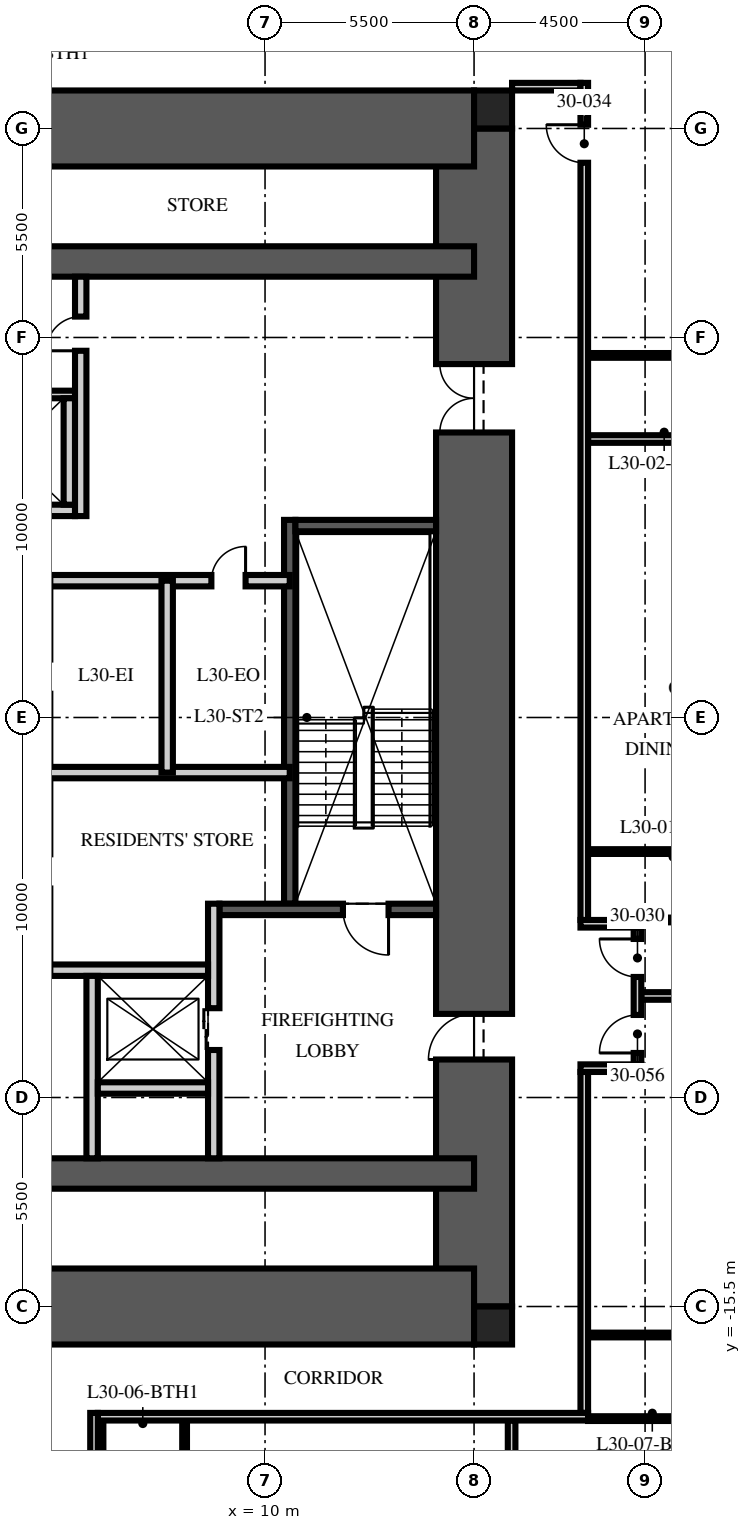
"""IFC4 building model, lengths in metres.
Left out: names, types, materials, properties, quantities, classifications, styles, units other than length and angle.
Written with IfcOpenShell. Run it as: python <this file> out.ifc"""

import sys

from ifc_helpers import new_model, si_unit, direction, frame, frame_2d, origin, origin_2d, place, context, subcontext, project, spatial, rectangle, extrude, element, fill, save


model = new_model("IFC4")
c1 = context("Model", 3, precision=1e-05, world=origin(), true_north=direction((0.0, 1.0)))
c2 = subcontext(c1, "Body", "Model", "MODEL_VIEW")
j1 = project(units=[si_unit("LENGTHUNIT", "METRE"), si_unit("PLANEANGLEUNIT", "RADIAN")], contexts=[c1])
p1 = place(None, origin())
s1 = spatial("IfcSite", under=j1, at=p1, CompositionType="ELEMENT")
p2 = place(p1, origin())
s2 = spatial("IfcBuilding", under=s1, at=p2, CompositionType="ELEMENT")
p3 = place(p2, frame((0.0, 0.0, 122.25)))
s3 = spatial("IfcBuildingStorey", under=s2, at=p3, CompositionType="ELEMENT", Elevation=122.25)
p4 = place(p3, frame((15.5, -15.5, -0.25), z_axis=(0.0, 0.0, 1.0), x_axis=(0.0, 1.0, 0.0)))
e1 = element("IfcWall", 1, at=p4, inside=s3, PredefinedType="SHEAR", context=c2, shape_type="SweptSolid", body=[
    extrude(rectangle(XDim=31.0, YDim=2.0, at=frame_2d((15.5, 0.0))), origin(), (0.0, 0.0, 1.0), 3.75),
])
p5 = place(p4, frame((6.5, 0.0, 0.25)))
e2 = element("IfcOpeningElement", 2, at=p5, cuts=e1, PredefinedType="OPENING", context=c2, shape_type="SweptSolid", body=[
    extrude(rectangle(XDim=1.2, YDim=2.1, at=frame_2d((0.6, 1.05))), frame((0.0, 1.01, 0.0), z_axis=(0.0, -1.0, 0.0), x_axis=(1.0, 0.0, 0.0)), (0.0, 0.0, 1.0), 2.02),
])
p6 = place(p4, frame((23.0, 0.0, 0.25)))
e3 = element("IfcOpeningElement", 3, at=p6, cuts=e1, PredefinedType="OPENING", context=c2, shape_type="SweptSolid", body=[
    extrude(rectangle(XDim=1.8, YDim=2.1, at=frame_2d((0.9, 1.05))), frame((0.0, 1.01, 0.0), z_axis=(0.0, -1.0, 0.0), x_axis=(1.0, 0.0, 0.0)), (0.0, 0.0, 1.0), 2.02),
])
p7 = place(p3, frame((-15.5, 15.5, -0.25), z_axis=(0.0, 0.0, 1.0), x_axis=(1.0, 0.0, 0.0)))
e4 = element("IfcWall", 4, at=p7, inside=s3, PredefinedType="SHEAR", context=c2, shape_type="SweptSolid", body=[
    extrude(rectangle(XDim=31.0, YDim=2.0, at=frame_2d((15.5, 0.0))), origin(), (0.0, 0.0, 1.0), 3.75),
])
p8 = place(p7, frame((5.0, 0.0, 0.25)))
e5 = element("IfcOpeningElement", 5, at=p8, cuts=e4, PredefinedType="OPENING", context=c2, shape_type="SweptSolid", body=[
    extrude(rectangle(XDim=1.0, YDim=2.1, at=frame_2d((0.5, 1.05))), frame((0.0, 1.01, 0.0), z_axis=(0.0, -1.0, 0.0), x_axis=(1.0, 0.0, 0.0)), (0.0, 0.0, 1.0), 2.02),
])
p9 = place(p3, frame((-15.5, -15.5, -0.25), z_axis=(0.0, 0.0, 1.0), x_axis=(1.0, 0.0, 0.0)))
e6 = element("IfcWall", 6, at=p9, inside=s3, PredefinedType="SHEAR", context=c2, shape_type="SweptSolid", body=[
    extrude(rectangle(XDim=31.0, YDim=2.0, at=frame_2d((15.5, 0.0))), origin(), (0.0, 0.0, 1.0), 3.75),
])
p10 = place(p9, frame((10.4, 0.0, 0.25)))
e7 = element("IfcOpeningElement", 7, at=p10, cuts=e6, PredefinedType="OPENING", context=c2, shape_type="SweptSolid", body=[
    extrude(rectangle(XDim=1.1, YDim=2.1, at=frame_2d((0.55, 1.05))), frame((0.0, 1.01, 0.0), z_axis=(0.0, -1.0, 0.0), x_axis=(1.0, 0.0, 0.0)), (0.0, 0.0, 1.0), 2.02),
])
p11 = place(p9, frame((13.5, 0.0, 0.25)))
e8 = element("IfcOpeningElement", 8, at=p11, cuts=e6, PredefinedType="OPENING", context=c2, shape_type="SweptSolid", body=[
    extrude(rectangle(XDim=1.1, YDim=2.1, at=frame_2d((0.55, 1.05))), frame((0.0, 1.01, 0.0), z_axis=(0.0, -1.0, 0.0), x_axis=(1.0, 0.0, 0.0)), (0.0, 0.0, 1.0), 2.02),
])
p12 = place(p9, frame((16.6, 0.0, 0.25)))
e9 = element("IfcOpeningElement", 9, at=p12, cuts=e6, PredefinedType="OPENING", context=c2, shape_type="SweptSolid", body=[
    extrude(rectangle(XDim=1.1, YDim=2.1, at=frame_2d((0.55, 1.05))), frame((0.0, 1.01, 0.0), z_axis=(0.0, -1.0, 0.0), x_axis=(1.0, 0.0, 0.0)), (0.0, 0.0, 1.0), 2.02),
])
for number, where, z_axis, x_axis in (
    (10, (-15.5, 12.0, -0.25), (0.0, 0.0, 1.0), (1.0, 0.0, 0.0)),
    (11, (-15.5, -12.0, -0.25), (0.0, 0.0, 1.0), (1.0, 0.0, 0.0)),
):
    element("IfcWall", number, at=place(p3, frame(where, z_axis=z_axis, x_axis=x_axis)), inside=s3, PredefinedType="SHEAR", context=c2, shape_type="SweptSolid", body=[
        extrude(rectangle(XDim=31.0, YDim=0.8, at=frame_2d((15.5, 0.0))), origin(), (0.0, 0.0, 1.0), 3.75),
    ])
for number, where, z_axis, x_axis in (
    (12, (16.0, 16.0, -0.25), (0.0, 0.0, 1.0), (1.0, 0.0, 0.0)),
    (13, (16.0, -16.0, -0.25), (0.0, 0.0, 1.0), (1.0, 0.0, 0.0)),
):
    element("IfcColumn", number, at=place(p3, frame(where, z_axis=z_axis, x_axis=x_axis)), inside=s3, PredefinedType="COLUMN", context=c2, shape_type="SweptSolid", body=[
        extrude(rectangle(XDim=1.0, YDim=1.0, at=origin_2d()), origin(), (0.0, 0.0, 1.0), 3.75),
    ])
p13 = place(p3, frame((10.65, -4.9, 0.0), z_axis=(0.0, 0.0, 1.0), x_axis=(0.0, 1.0, 0.0)))
e14 = element("IfcWall", 14, at=p13, inside=s3, PredefinedType="SOLIDWALL", context=c2, shape_type="SweptSolid", body=[
    extrude(rectangle(XDim=10.1, YDim=0.3, at=frame_2d((5.05, 0.0))), origin(), (0.0, 0.0, 1.0), 3.5),
])
p14 = place(p3, frame((14.5, -5.05, 0.0), z_axis=(0.0, 0.0, 1.0), x_axis=(-1.0, 0.0, 0.0)))
e15 = element("IfcWall", 15, at=p14, inside=s3, PredefinedType="SOLIDWALL", context=c2, shape_type="SweptSolid", body=[
    extrude(rectangle(XDim=5.7, YDim=0.3, at=frame_2d((2.85, 0.0))), origin(), (0.0, 0.0, 1.0), 3.5),
])
p15 = place(p14, frame((1.25, 0.0, 0.0)))
e16 = element("IfcOpeningElement", 16, at=p15, cuts=e15, PredefinedType="OPENING", context=c2, shape_type="SweptSolid", body=[
    extrude(rectangle(XDim=1.2, YDim=2.1, at=frame_2d((0.6, 1.05))), frame((0.0, 0.16, 0.0), z_axis=(0.0, -1.0, 0.0), x_axis=(1.0, 0.0, 0.0)), (0.0, 0.0, 1.0), 0.32),
])
p16 = place(p3, frame((14.5, 5.05, 0.0), z_axis=(0.0, 0.0, 1.0), x_axis=(-1.0, 0.0, 0.0)))
e17 = element("IfcWall", 17, at=p16, inside=s3, PredefinedType="SOLIDWALL", context=c2, shape_type="SweptSolid", body=[
    extrude(rectangle(XDim=3.7, YDim=0.3, at=frame_2d((1.85, 0.0))), origin(), (0.0, 0.0, 1.0), 3.5),
])
p17 = place(p3, frame((8.65, -11.6, 0.0), z_axis=(0.0, 0.0, 1.0), x_axis=(0.0, 1.0, 0.0)))
e18 = element("IfcWall", 18, at=p17, inside=s3, PredefinedType="PARTITIONING", context=c2, shape_type="SweptSolid", body=[
    extrude(rectangle(XDim=6.7, YDim=0.3, at=frame_2d((3.35, 0.0))), origin(), (0.0, 0.0, 1.0), 3.5),
])
p18 = place(p17, frame((2.85, 0.0, 0.0)))
e19 = element("IfcOpeningElement", 19, at=p18, cuts=e18, PredefinedType="OPENING", context=c2, shape_type="SweptSolid", body=[
    extrude(rectangle(XDim=1.1, YDim=2.1, at=frame_2d((0.55, 1.05))), frame((0.0, 0.16, 0.0), z_axis=(0.0, -1.0, 0.0), x_axis=(1.0, 0.0, 0.0)), (0.0, 0.0, 1.0), 0.32),
])
p19 = place(p3, frame((-8.5, -6.65, 0.0), z_axis=(0.0, 0.0, 1.0), x_axis=(1.0, 0.0, 0.0)))
e20 = element("IfcWall", 20, at=p19, inside=s3, PredefinedType="PARTITIONING", context=c2, shape_type="SweptSolid", body=[
    extrude(rectangle(XDim=17.0, YDim=0.3, at=frame_2d((8.5, 0.0))), origin(), (0.0, 0.0, 1.0), 3.5),
])
p20 = place(p19, frame((7.8, 0.0, 0.0)))
e21 = element("IfcOpeningElement", 21, at=p20, cuts=e20, PredefinedType="OPENING", context=c2, shape_type="SweptSolid", body=[
    extrude(rectangle(XDim=1.3, YDim=2.4, at=frame_2d((0.65, 1.2))), frame((0.0, 0.16, 0.0), z_axis=(0.0, -1.0, 0.0), x_axis=(1.0, 0.0, 0.0)), (0.0, 0.0, 1.0), 0.32),
])
p21 = place(p19, frame((5.65, 0.0, 0.0)))
e22 = element("IfcOpeningElement", 22, at=p21, cuts=e20, PredefinedType="OPENING", context=c2, shape_type="SweptSolid", body=[
    extrude(rectangle(XDim=0.9, YDim=2.1, at=frame_2d((0.45, 1.05))), frame((0.0, 0.16, 0.0), z_axis=(0.0, -1.0, 0.0), x_axis=(1.0, 0.0, 0.0)), (0.0, 0.0, 1.0), 0.32),
])
p22 = place(p19, frame((10.4, 0.0, 0.0)))
e23 = element("IfcOpeningElement", 23, at=p22, cuts=e20, PredefinedType="OPENING", context=c2, shape_type="SweptSolid", body=[
    extrude(rectangle(XDim=0.9, YDim=2.1, at=frame_2d((0.45, 1.05))), frame((0.0, 0.16, 0.0), z_axis=(0.0, -1.0, 0.0), x_axis=(1.0, 0.0, 0.0)), (0.0, 0.0, 1.0), 0.32),
])
p23 = place(p3, frame((5.45, -11.6, 0.0), z_axis=(0.0, 0.0, 1.0), x_axis=(0.0, 1.0, 0.0)))
e24 = element("IfcWall", 24, at=p23, inside=s3, PredefinedType="PARTITIONING", context=c2, shape_type="SweptSolid", body=[
    extrude(rectangle(XDim=4.8, YDim=0.3, at=frame_2d((2.4, 0.0))), origin(), (0.0, 0.0, 1.0), 3.5),
])
p24 = place(p3, frame((5.6, -9.75, 0.0), z_axis=(0.0, 0.0, 1.0), x_axis=(1.0, 0.0, 0.0)))
e25 = element("IfcWall", 25, at=p24, inside=s3, PredefinedType="PARTITIONING", context=c2, shape_type="SweptSolid", body=[
    extrude(rectangle(XDim=2.9, YDim=0.3, at=frame_2d((1.45, 0.0))), origin(), (0.0, 0.0, 1.0), 3.5),
])
p25 = place(p3, frame((-4.7, 5.45, 0.0), z_axis=(0.0, 0.0, 1.0), x_axis=(1.0, 0.0, 0.0)))
e26 = element("IfcWall", 26, at=p25, inside=s3, PredefinedType="PARTITIONING", context=c2, shape_type="SweptSolid", body=[
    extrude(rectangle(XDim=9.7, YDim=0.3, at=frame_2d((4.85, 0.0))), origin(), (0.0, 0.0, 1.0), 3.5),
])
p26 = place(p3, frame((-4.7, 8.5, 0.0), z_axis=(0.0, 0.0, 1.0), x_axis=(1.0, 0.0, 0.0)))
e27 = element("IfcWall", 27, at=p26, inside=s3, PredefinedType="PARTITIONING", context=c2, shape_type="SweptSolid", body=[
    extrude(rectangle(XDim=9.7, YDim=0.2, at=frame_2d((4.85, 0.0))), origin(), (0.0, 0.0, 1.0), 3.5),
])
p27 = place(p3, frame((4.85, 5.6, 0.0), z_axis=(0.0, 0.0, 1.0), x_axis=(0.0, 1.0, 0.0)))
e28 = element("IfcWall", 28, at=p27, inside=s3, PredefinedType="PARTITIONING", context=c2, shape_type="SweptSolid", body=[
    extrude(rectangle(XDim=2.8, YDim=0.3, at=frame_2d((1.4, 0.0))), origin(), (0.0, 0.0, 1.0), 3.5),
])
p28 = place(p3, frame((-10.65, 3.6, 0.0), z_axis=(0.0, 0.0, 1.0), x_axis=(1.0, 0.0, 0.0)))
e29 = element("IfcWall", 29, at=p28, inside=s3, PredefinedType="PARTITIONING", context=c2, shape_type="SweptSolid", body=[
    extrude(rectangle(XDim=21.3, YDim=0.3, at=frame_2d((10.65, 0.0))), origin(), (0.0, 0.0, 1.0), 3.5),
])
p29 = place(p28, frame((10.05, 0.0, 0.0)))
e30 = element("IfcOpeningElement", 30, at=p29, cuts=e29, PredefinedType="OPENING", context=c2, shape_type="SweptSolid", body=[
    extrude(rectangle(XDim=1.2, YDim=2.1, at=frame_2d((0.6, 1.05))), frame((0.0, 0.16, 0.0), z_axis=(0.0, -1.0, 0.0), x_axis=(1.0, 0.0, 0.0)), (0.0, 0.0, 1.0), 0.32),
])
p30 = place(p28, frame((19.238, 0.0, 0.0)))
e31 = element("IfcOpeningElement", 31, at=p30, cuts=e29, PredefinedType="OPENING", context=c2, shape_type="SweptSolid", body=[
    extrude(rectangle(XDim=0.9, YDim=2.1, at=frame_2d((0.45, 1.05))), frame((0.0, 0.16, 0.0), z_axis=(0.0, -1.0, 0.0), x_axis=(1.0, 0.0, 0.0)), (0.0, 0.0, 1.0), 0.32),
])
p31 = place(p3, frame((10.65, -1.45, 0.0), z_axis=(0.0, 0.0, 1.0), x_axis=(-1.0, 0.0, 0.0)))
e32 = element("IfcWall", 32, at=p31, inside=s3, PredefinedType="PARTITIONING", context=c2, shape_type="SweptSolid", body=[
    extrude(rectangle(XDim=6.45, YDim=0.3, at=frame_2d((3.225, 0.0))), origin(), (0.0, 0.0, 1.0), 3.5),
])
p32 = place(p3, frame((7.425, -1.45, 0.0), z_axis=(0.0, 0.0, 1.0), x_axis=(0.0, 1.0, 0.0)))
e33 = element("IfcWall", 33, at=p32, inside=s3, PredefinedType="PARTITIONING", context=c2, shape_type="SweptSolid", body=[
    extrude(rectangle(XDim=5.05, YDim=0.3, at=frame_2d((2.525, 0.0))), origin(), (0.0, 0.0, 1.0), 3.5),
])
p33 = place(p3, frame((5.15, 5.3, 0.0), z_axis=(0.0, 0.0, 1.0), x_axis=(0.0, 1.0, 0.0)))
e34 = element("IfcWall", 34, at=p33, inside=s3, PredefinedType="PARTITIONING", context=c2, shape_type="SweptSolid", body=[
    extrude(rectangle(XDim=6.3, YDim=0.3, at=frame_2d((3.15, 0.0))), origin(), (0.0, 0.0, 1.0), 3.5),
])
p34 = place(p33, frame((4.35, 0.0, 0.0)))
e35 = element("IfcOpeningElement", 35, at=p34, cuts=e34, PredefinedType="OPENING", context=c2, shape_type="SweptSolid", body=[
    extrude(rectangle(XDim=0.9, YDim=2.1, at=frame_2d((0.45, 1.05))), frame((0.0, 0.16, 0.0), z_axis=(0.0, -1.0, 0.0), x_axis=(1.0, 0.0, 0.0)), (0.0, 0.0, 1.0), 0.32),
])
p35 = place(p3, frame((16.5, 16.6, 0.0), z_axis=(0.0, 0.0, 1.0), x_axis=(1.0, 0.0, 0.0)))
e36 = element("IfcWall", 36, at=p35, inside=s3, PredefinedType="PARTITIONING", context=c2, shape_type="SweptSolid", body=[
    extrude(rectangle(XDim=1.8, YDim=0.2, at=frame_2d((0.9, 0.0))), origin(), (0.0, 0.0, 1.0), 2.3),
])
p36 = place(p3, frame((19.9, -7.328, 0.0), z_axis=(0.0, 0.0, 1.0), x_axis=(1.0, 0.0, 0.0)))
e37 = element("IfcWall", 37, at=p36, inside=s3, PredefinedType="PARTITIONING", context=c2, shape_type="SweptSolid", body=[
    extrude(rectangle(XDim=9.0, YDim=0.2, at=frame_2d((4.5, 0.0))), origin(), (0.0, 0.0, 1.0), 2.81),
])
for number, where, z_axis, x_axis in (
    (38, (18.5, 7.328, 0.0), (0.0, 0.0, 1.0), (1.0, 0.0, 0.0)),
    (39, (16.488, -18.5, 0.0), (0.0, 0.0, 1.0), (0.0, -1.0, 0.0)),
):
    element("IfcWall", number, at=place(p3, frame(where, z_axis=z_axis, x_axis=x_axis)), inside=s3, PredefinedType="PARTITIONING", context=c2, shape_type="SweptSolid", body=[
        extrude(rectangle(XDim=10.4, YDim=0.2, at=frame_2d((5.2, 0.0))), origin(), (0.0, 0.0, 1.0), 2.81),
    ])
p37 = place(p3, frame((19.97, -5.328, 0.0), z_axis=(0.0, 0.0, 1.0), x_axis=(1.0, 0.0, 0.0)))
e40 = element("IfcWall", 40, at=p37, inside=s3, PredefinedType="PARTITIONING", context=c2, shape_type="SweptSolid", body=[
    extrude(rectangle(XDim=2.81, YDim=0.125, at=frame_2d((1.405, 0.0))), origin(), (0.0, 0.0, 1.0), 3.5),
])
for number, where, z_axis, x_axis in (
    (41, (18.5, -3.528, 0.0), (0.0, 0.0, 1.0), (1.0, 0.0, 0.0)),
    (42, (18.5, 9.528, 0.0), (0.0, 0.0, 1.0), (1.0, 0.0, 0.0)),
    (43, (5.684, -18.5, 0.0), (0.0, 0.0, 1.0), (0.0, -1.0, 0.0)),
    (44, (7.884, -18.5, 0.0), (0.0, 0.0, 1.0), (0.0, -1.0, 0.0)),
):
    element("IfcWall", number, at=place(p3, frame(where, z_axis=z_axis, x_axis=x_axis)), inside=s3, PredefinedType="PARTITIONING", context=c2, shape_type="SweptSolid", body=[
        extrude(rectangle(XDim=4.28, YDim=0.125, at=frame_2d((2.14, 0.0))), origin(), (0.0, 0.0, 1.0), 3.5),
    ])
p38 = place(p3, frame((18.5, -18.45, 0.0), z_axis=(0.0, 0.0, 1.0), x_axis=(1.0, 0.0, 0.0)))
e45 = element("IfcWall", 45, at=p38, inside=s3, PredefinedType="PARTITIONING", context=c2, shape_type="SweptSolid", body=[
    extrude(rectangle(XDim=4.28, YDim=0.125, at=frame_2d((2.14, 0.0))), origin(), (0.0, 0.0, 1.0), 2.3),
])
p39 = place(p3, frame((18.5, -16.25, 0.0), z_axis=(0.0, 0.0, 1.0), x_axis=(1.0, 0.0, 0.0)))
e46 = element("IfcWall", 46, at=p39, inside=s3, PredefinedType="PARTITIONING", context=c2, shape_type="SweptSolid", body=[
    extrude(rectangle(XDim=4.28, YDim=0.125, at=frame_2d((2.14, 0.0))), origin(), (0.0, 0.0, 1.0), 3.5),
])
p40 = place(p3, frame((18.4, -18.3, 0.0), z_axis=(0.0, 0.0, 1.0), x_axis=(0.0, 1.0, 0.0)))
e47 = element("IfcWall", 47, at=p40, inside=s3, PredefinedType="PARTITIONING", context=c2, shape_type="SweptSolid", body=[
    extrude(rectangle(XDim=8.972, YDim=0.2, at=frame_2d((4.486, 0.0))), origin(), (0.0, 0.0, 1.0), 2.3),
])
p41 = place(p3, frame((18.3, -9.228, 0.0), z_axis=(0.0, 0.0, 1.0), x_axis=(1.0, 0.0, 0.0)))
e48 = element("IfcWall", 48, at=p41, inside=s3, PredefinedType="PARTITIONING", context=c2, shape_type="SweptSolid", body=[
    extrude(rectangle(XDim=1.6, YDim=0.2, at=frame_2d((0.8, 0.0))), origin(), (0.0, 0.0, 1.0), 2.7),
])
p42 = place(p3, frame((18.3, -5.428, 0.0), z_axis=(0.0, 0.0, 1.0), x_axis=(1.0, 0.0, 0.0)))
e49 = element("IfcWall", 49, at=p42, inside=s3, PredefinedType="PARTITIONING", context=c2, shape_type="SweptSolid", body=[
    extrude(rectangle(XDim=1.6, YDim=0.2, at=frame_2d((0.8, 0.0))), origin(), (0.0, 0.0, 1.0), 3.5),
])
p43 = place(p3, frame((19.8, -9.128, 0.0), z_axis=(0.0, 0.0, 1.0), x_axis=(0.0, 1.0, 0.0)))
e50 = element("IfcWall", 50, at=p43, inside=s3, PredefinedType="PARTITIONING", context=c2, shape_type="SweptSolid", body=[
    extrude(rectangle(XDim=3.6, YDim=0.2, at=frame_2d((1.8, 0.0))), origin(), (0.0, 0.0, 1.0), 2.7),
])
p44 = place(p43, frame((2.3, 0.0, 0.0)))
e51 = element("IfcOpeningElement", 51, at=p44, cuts=e50, PredefinedType="OPENING", context=c2, shape_type="SweptSolid", body=[
    extrude(rectangle(XDim=1.0, YDim=2.2, at=frame_2d((0.5, 1.1))), frame((0.0, 0.11, 0.0), z_axis=(0.0, -1.0, 0.0), x_axis=(1.0, 0.0, 0.0)), (0.0, 0.0, 1.0), 0.22),
])
p45 = place(p43, frame((0.3, 0.0, 0.0)))
e52 = element("IfcOpeningElement", 52, at=p45, cuts=e50, PredefinedType="OPENING", context=c2, shape_type="SweptSolid", body=[
    extrude(rectangle(XDim=1.0, YDim=2.2, at=frame_2d((0.5, 1.1))), frame((0.0, 0.11, 0.0), z_axis=(0.0, -1.0, 0.0), x_axis=(1.0, 0.0, 0.0)), (0.0, 0.0, 1.0), 0.22),
])
p46 = place(p3, frame((18.4, -5.328, 0.0), z_axis=(0.0, 0.0, 1.0), x_axis=(0.0, 1.0, 0.0)))
e53 = element("IfcWall", 53, at=p46, inside=s3, PredefinedType="PARTITIONING", context=c2, shape_type="SweptSolid", body=[
    extrude(rectangle(XDim=22.028, YDim=0.2, at=frame_2d((11.014, 0.0))), origin(), (0.0, 0.0, 1.0), 2.7),
])
p47 = place(p46, frame((19.926, 0.0, 0.0)))
e54 = element("IfcOpeningElement", 54, at=p47, cuts=e53, PredefinedType="OPENING", context=c2, shape_type="SweptSolid", body=[
    extrude(rectangle(XDim=1.0, YDim=2.2, at=frame_2d((0.5, 1.1))), frame((0.0, 0.11, 0.0), z_axis=(0.0, -1.0, 0.0), x_axis=(1.0, 0.0, 0.0)), (0.0, 0.0, 1.0), 0.22),
])
p48 = place(p3, frame((18.5, -18.4, 0.0), z_axis=(0.0, 0.0, 1.0), x_axis=(-1.0, 0.0, 0.0)))
e55 = element("IfcWall", 55, at=p48, inside=s3, PredefinedType="PARTITIONING", context=c2, shape_type="SweptSolid", body=[
    extrude(rectangle(XDim=12.9, YDim=0.2, at=frame_2d((6.45, 0.0))), origin(), (0.0, 0.0, 1.0), 2.3),
])
p49 = place(p3, frame((5.5, -18.3, 0.0), z_axis=(0.0, 0.0, 1.0), x_axis=(0.0, -1.0, 0.0)))
e56 = element("IfcWall", 56, at=p49, inside=s3, PredefinedType="PARTITIONING", context=c2, shape_type="SweptSolid", body=[
    extrude(rectangle(XDim=3.0, YDim=0.2, at=frame_2d((1.5, 0.0))), origin(), (0.0, 0.0, 1.0), 3.5),
])
p50 = place(p15, origin())
e57 = element("IfcDoor", 57, at=p50, inside=s3, OperationType="SINGLE_SWING_LEFT", PredefinedType="DOOR", context=c2, shape_type="SweptSolid", body=[
    extrude(rectangle(XDim=1.2, YDim=2.1, at=frame_2d((0.6, 1.05))), frame((0.0, 0.025, 0.0), z_axis=(0.0, -1.0, 0.0), x_axis=(1.0, 0.0, 0.0)), (0.0, 0.0, 1.0), 0.05),
])
fill(e16, e57)
p51 = place(p5, origin())
e58 = element("IfcDoor", 58, at=p51, inside=s3, OperationType="SINGLE_SWING_LEFT", PredefinedType="DOOR", context=c2, shape_type="SweptSolid", body=[
    extrude(rectangle(XDim=1.2, YDim=2.1, at=frame_2d((0.6, 1.05))), frame((0.0, 0.025, 0.0), z_axis=(0.0, -1.0, 0.0), x_axis=(1.0, 0.0, 0.0)), (0.0, 0.0, 1.0), 0.05),
])
fill(e2, e58)
p52 = place(p6, origin())
e59 = element("IfcDoor", 59, at=p52, inside=s3, OperationType="DOUBLE_DOOR_SINGLE_SWING", PredefinedType="DOOR", context=c2, shape_type="SweptSolid", body=[
    extrude(rectangle(XDim=1.8, YDim=2.1, at=frame_2d((0.9, 1.05))), frame((0.0, 0.025, 0.0), z_axis=(0.0, -1.0, 0.0), x_axis=(1.0, 0.0, 0.0)), (0.0, 0.0, 1.0), 0.05),
])
fill(e3, e59)
p53 = place(p18, origin())
e60 = element("IfcDoor", 60, at=p53, inside=s3, OperationType="DOUBLE_DOOR_SLIDING", PredefinedType="DOOR", context=c2, shape_type="SweptSolid", body=[
    extrude(rectangle(XDim=1.1, YDim=2.1, at=frame_2d((0.55, 1.05))), frame((0.0, 0.025, 0.0), z_axis=(0.0, -1.0, 0.0), x_axis=(1.0, 0.0, 0.0)), (0.0, 0.0, 1.0), 0.05),
])
fill(e19, e60)
p54 = place(p30, origin())
e61 = element("IfcDoor", 61, at=p54, inside=s3, OperationType="SINGLE_SWING_RIGHT", PredefinedType="DOOR", context=c2, shape_type="SweptSolid", body=[
    extrude(rectangle(XDim=0.9, YDim=2.1, at=frame_2d((0.45, 1.05))), frame((0.0, 0.025, 0.0), z_axis=(0.0, -1.0, 0.0), x_axis=(1.0, 0.0, 0.0)), (0.0, 0.0, 1.0), 0.05),
])
fill(e31, e61)
p55 = place(p34, origin())
e62 = element("IfcDoor", 62, at=p55, inside=s3, OperationType="SINGLE_SWING_LEFT", PredefinedType="DOOR", context=c2, shape_type="SweptSolid", body=[
    extrude(rectangle(XDim=0.9, YDim=2.1, at=frame_2d((0.45, 1.05))), frame((0.0, 0.025, 0.0), z_axis=(0.0, -1.0, 0.0), x_axis=(1.0, 0.0, 0.0)), (0.0, 0.0, 1.0), 0.05),
])
fill(e35, e62)
p56 = place(p44, origin())
e63 = element("IfcDoor", 63, at=p56, inside=s3, OperationType="SINGLE_SWING_RIGHT", PredefinedType="DOOR", context=c2, shape_type="SweptSolid", body=[
    extrude(rectangle(XDim=1.0, YDim=2.2, at=frame_2d((0.5, 1.1))), frame((0.0, 0.025, 0.0), z_axis=(0.0, -1.0, 0.0), x_axis=(1.0, 0.0, 0.0)), (0.0, 0.0, 1.0), 0.05),
])
fill(e51, e63)
p57 = place(p47, origin())
e64 = element("IfcDoor", 64, at=p57, inside=s3, OperationType="SINGLE_SWING_RIGHT", PredefinedType="DOOR", context=c2, shape_type="SweptSolid", body=[
    extrude(rectangle(XDim=1.0, YDim=2.2, at=frame_2d((0.5, 1.1))), frame((0.0, 0.025, 0.0), z_axis=(0.0, -1.0, 0.0), x_axis=(1.0, 0.0, 0.0)), (0.0, 0.0, 1.0), 0.05),
])
fill(e54, e64)
p58 = place(p45, origin())
e65 = element("IfcDoor", 65, at=p58, inside=s3, OperationType="SINGLE_SWING_LEFT", PredefinedType="DOOR", context=c2, shape_type="SweptSolid", body=[
    extrude(rectangle(XDim=1.0, YDim=2.2, at=frame_2d((0.5, 1.1))), frame((0.0, 0.025, 0.0), z_axis=(0.0, -1.0, 0.0), x_axis=(1.0, 0.0, 0.0)), (0.0, 0.0, 1.0), 0.05),
])
fill(e52, e65)
save(model, sys.argv[1])
